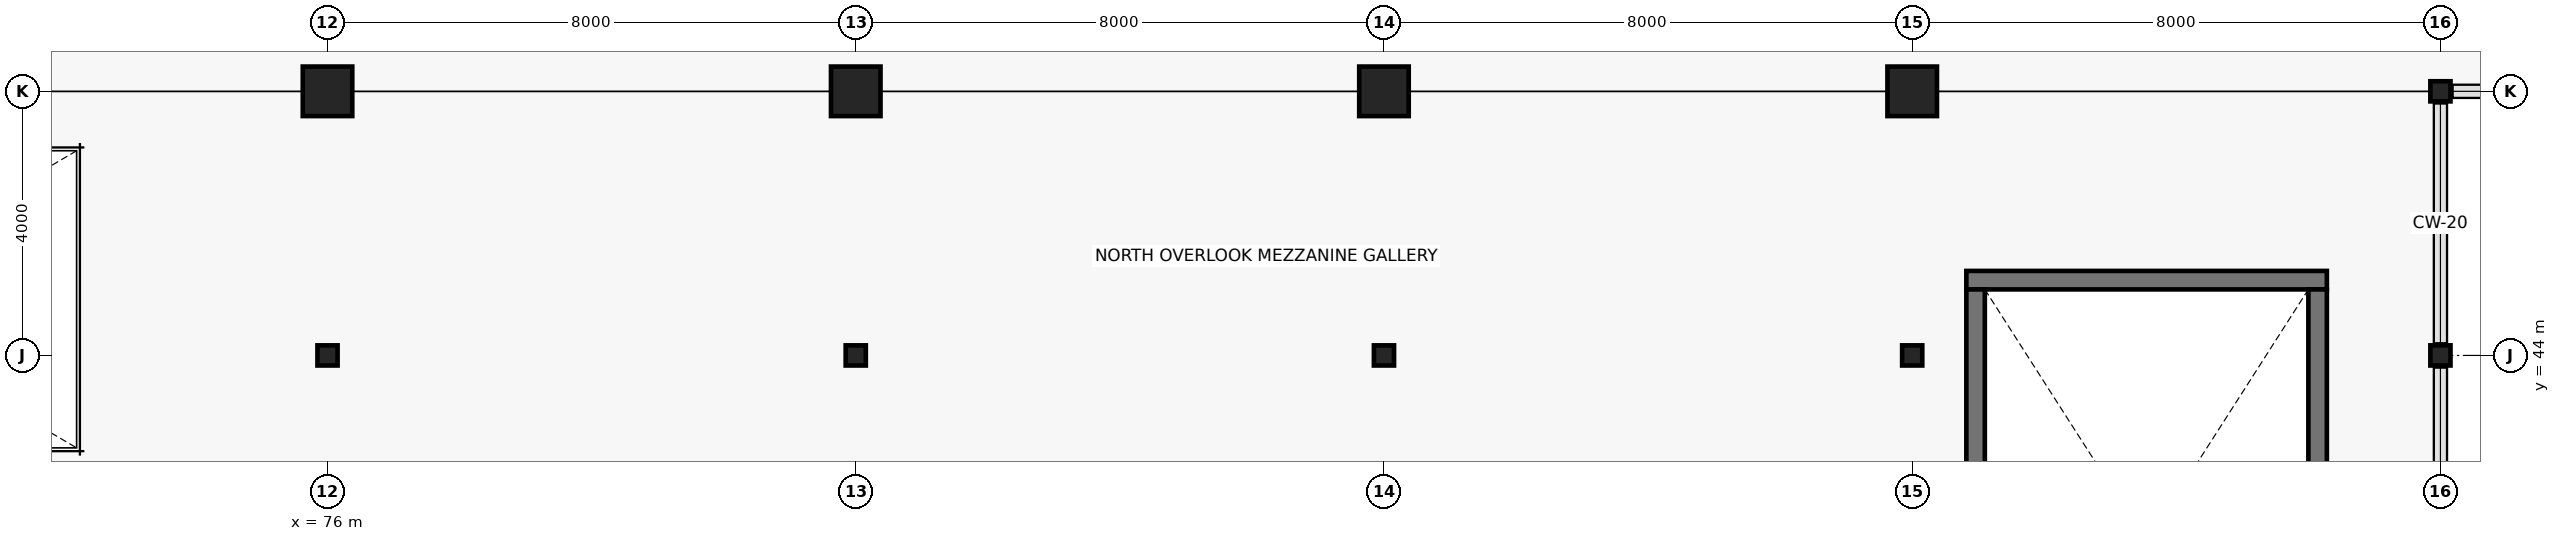
"""IFC4 building model, lengths in metres.
Left out: names, types, materials, properties, quantities, classifications, styles, units other than length and angle.
Written with IfcOpenShell. Run it as: python <this file> out.ifc"""

import sys

from ifc_helpers import new_model, si_unit, direction, frame, frame_2d, origin, origin_2d, place, context, subcontext, project, spatial, rectangle, hollow_rectangle, circle, extrude, element, save


model = new_model("IFC4")
c1 = context("Model", 3, precision=1e-05, world=origin(), true_north=direction((0.0, 1.0)))
c2 = subcontext(c1, "Body", "Model", "MODEL_VIEW")
j1 = project(units=[si_unit("LENGTHUNIT", "METRE"), si_unit("PLANEANGLEUNIT", "RADIAN")], contexts=[c1])
p1 = place(None, origin())
s1 = spatial("IfcSite", under=j1, at=p1, CompositionType="ELEMENT")
p2 = place(p1, origin())
s2 = spatial("IfcBuilding", under=s1, at=p2, CompositionType="ELEMENT")
p3 = place(p2, frame((0.0, 0.0, 6.6)))
s3 = spatial("IfcBuildingStorey", under=s2, at=p3, CompositionType="ELEMENT", Elevation=6.6)
p4 = place(p3, frame((76.0, 44.0, 0.0), z_axis=(0.0, 0.0, 1.0), x_axis=(1.0, 0.0, 0.0)))
e1 = element("IfcColumn", 1, at=p4, inside=s3, PredefinedType="COLUMN", context=c2, shape_type="SweptSolid", body=[
    extrude(hollow_rectangle(XDim=0.305, YDim=0.305, WallThickness=0.013, InnerFilletRadius=0.013, OuterFilletRadius=0.025, at=origin_2d()), origin(), (0.0, 0.0, 1.0), 4.8),
])
p5 = place(p3, frame((76.0, 48.0, 0.0), z_axis=(0.0, 0.0, 1.0), x_axis=(1.0, 0.0, 0.0)))
e2 = element("IfcColumn", 2, at=p5, inside=s3, PredefinedType="COLUMN", context=c2, shape_type="SweptSolid", body=[
    extrude(circle(Radius=0.375, at=origin_2d()), origin(), (0.0, 0.0, 1.0), 4.8),
])
p6 = place(p3, frame((84.0, 44.0, 0.0), z_axis=(0.0, 0.0, 1.0), x_axis=(1.0, 0.0, 0.0)))
e3 = element("IfcColumn", 3, at=p6, inside=s3, PredefinedType="COLUMN", context=c2, shape_type="SweptSolid", body=[
    extrude(hollow_rectangle(XDim=0.305, YDim=0.305, WallThickness=0.013, InnerFilletRadius=0.013, OuterFilletRadius=0.025, at=origin_2d()), origin(), (0.0, 0.0, 1.0), 4.8),
])
p7 = place(p3, frame((84.0, 48.0, 0.0), z_axis=(0.0, 0.0, 1.0), x_axis=(1.0, 0.0, 0.0)))
e4 = element("IfcColumn", 4, at=p7, inside=s3, PredefinedType="COLUMN", context=c2, shape_type="SweptSolid", body=[
    extrude(circle(Radius=0.375, at=origin_2d()), origin(), (0.0, 0.0, 1.0), 4.8),
])
p8 = place(p3, frame((92.0, 44.0, 0.0), z_axis=(0.0, 0.0, 1.0), x_axis=(1.0, 0.0, 0.0)))
e5 = element("IfcColumn", 5, at=p8, inside=s3, PredefinedType="COLUMN", context=c2, shape_type="SweptSolid", body=[
    extrude(hollow_rectangle(XDim=0.305, YDim=0.305, WallThickness=0.013, InnerFilletRadius=0.013, OuterFilletRadius=0.025, at=origin_2d()), origin(), (0.0, 0.0, 1.0), 4.8),
])
p9 = place(p3, frame((92.0, 48.0, 0.0), z_axis=(0.0, 0.0, 1.0), x_axis=(1.0, 0.0, 0.0)))
e6 = element("IfcColumn", 6, at=p9, inside=s3, PredefinedType="COLUMN", context=c2, shape_type="SweptSolid", body=[
    extrude(circle(Radius=0.375, at=origin_2d()), origin(), (0.0, 0.0, 1.0), 4.8),
])
p10 = place(p3, frame((100.0, 44.0, 0.0), z_axis=(0.0, 0.0, 1.0), x_axis=(1.0, 0.0, 0.0)))
e7 = element("IfcColumn", 7, at=p10, inside=s3, PredefinedType="COLUMN", context=c2, shape_type="SweptSolid", body=[
    extrude(hollow_rectangle(XDim=0.305, YDim=0.305, WallThickness=0.013, InnerFilletRadius=0.013, OuterFilletRadius=0.025, at=origin_2d()), origin(), (0.0, 0.0, 1.0), 4.8),
])
p11 = place(p3, frame((100.0, 48.0, 0.0), z_axis=(0.0, 0.0, 1.0), x_axis=(1.0, 0.0, 0.0)))
e8 = element("IfcColumn", 8, at=p11, inside=s3, PredefinedType="COLUMN", context=c2, shape_type="SweptSolid", body=[
    extrude(circle(Radius=0.375, at=origin_2d()), origin(), (0.0, 0.0, 1.0), 4.8),
])
for number, where, z_axis, x_axis in (
    (9, (108.0, 44.0, 0.0), (0.0, 0.0, 1.0), (1.0, 0.0, 0.0)),
    (10, (108.0, 48.0, 0.0), (0.0, 0.0, 1.0), (1.0, 0.0, 0.0)),
):
    element("IfcColumn", number, at=place(p3, frame(where, z_axis=z_axis, x_axis=x_axis)), inside=s3, PredefinedType="COLUMN", context=c2, shape_type="SweptSolid", body=[
        extrude(hollow_rectangle(XDim=0.305, YDim=0.305, WallThickness=0.013, InnerFilletRadius=0.013, OuterFilletRadius=0.025, at=origin_2d()), origin(), (0.0, 0.0, 1.0), 4.8),
    ])
p12 = place(p3, frame((106.28, 45.14, 0.0), z_axis=(0.0, 0.0, 1.0), x_axis=(-1.0, 0.0, 0.0)))
e11 = element("IfcWall", 11, at=p12, inside=s3, PredefinedType="SHEAR", context=c2, shape_type="SweptSolid", body=[
    extrude(rectangle(XDim=5.46, YDim=0.28, at=frame_2d((2.73, 0.0))), origin(), (0.0, 0.0, 1.0), 4.54),
])
for number, where, z_axis, x_axis in (
    (12, (100.96, 45.0, 0.0), (0.0, 0.0, 1.0), (0.0, -1.0, 0.0)),
    (13, (106.14, 35.0, 0.0), (0.0, 0.0, 1.0), (0.0, 1.0, 0.0)),
):
    element("IfcWall", number, at=place(p3, frame(where, z_axis=z_axis, x_axis=x_axis)), inside=s3, PredefinedType="SHEAR", context=c2, shape_type="SweptSolid", body=[
        extrude(rectangle(XDim=10.0, YDim=0.28, at=frame_2d((5.0, 0.0))), origin(), (0.0, 0.0, 1.0), 4.54),
    ])
save(model, sys.argv[1])
